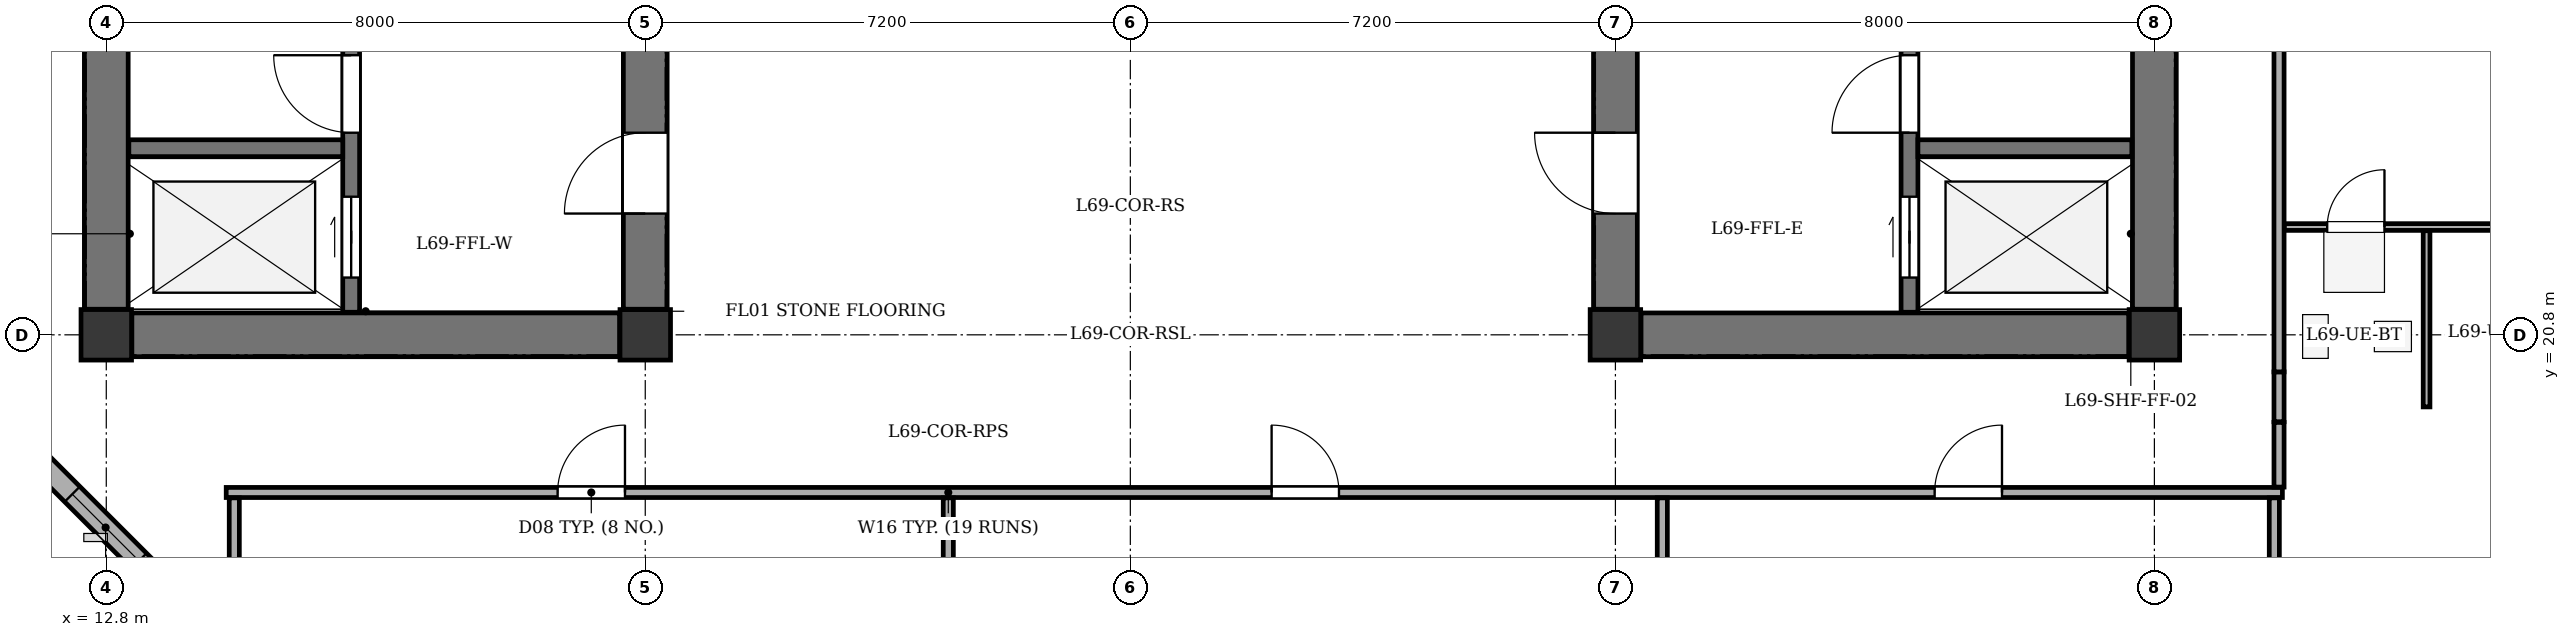
"""IFC4 building model, lengths in metres.
Left out: names, types, materials, properties, quantities, classifications, styles, units other than length and angle.
Written with IfcOpenShell. Run it as: python <this file> out.ifc"""

import sys

from ifc_helpers import new_model, si_unit, direction, frame, frame_2d, origin, origin_2d, place, context, subcontext, project, spatial, rectangle, extrude, element, fill, save


model = new_model("IFC4")
c1 = context("Model", 3, precision=1e-05, world=origin(), true_north=direction((0.0, 1.0)))
c2 = subcontext(c1, "Body", "Model", "MODEL_VIEW")
j1 = project(units=[si_unit("LENGTHUNIT", "METRE"), si_unit("PLANEANGLEUNIT", "RADIAN")], contexts=[c1])
p1 = place(None, origin())
s1 = spatial("IfcSite", under=j1, at=p1, CompositionType="ELEMENT")
p2 = place(p1, origin())
s2 = spatial("IfcBuilding", under=s1, at=p2, CompositionType="ELEMENT")
p3 = place(p2, frame((0.0, 0.0, 261.9)))
s3 = spatial("IfcBuildingStorey", under=s2, at=p3, CompositionType="ELEMENT", Elevation=261.9)
for number, where, z_axis, x_axis in (
    (1, (12.8, 20.8, 0.0), (0.0, 0.0, 1.0), (1.0, 0.0, 0.0)),
    (2, (20.8, 20.8, 0.0), (0.0, 0.0, 1.0), (1.0, 0.0, 0.0)),
    (3, (35.2, 20.8, 0.0), (0.0, 0.0, 1.0), (1.0, 0.0, 0.0)),
    (4, (43.2, 20.8, 0.0), (0.0, 0.0, 1.0), (1.0, 0.0, 0.0)),
):
    element("IfcColumn", number, at=place(p3, frame(where, z_axis=z_axis, x_axis=x_axis)), inside=s3, PredefinedType="COLUMN", context=c2, shape_type="SweptSolid", body=[
        extrude(rectangle(XDim=0.75, YDim=0.75, at=origin_2d()), origin(), (0.0, 0.0, 1.0), 3.4),
    ])
p4 = place(p3, frame((14.7, 16.03, 0.0), z_axis=(0.0, 0.0, 1.0), x_axis=(-0.707106781187, 0.707106781187, 0.0)))
e5 = element("IfcWall", 5, at=p4, inside=s3, PredefinedType="STANDARD", context=c2, shape_type="SweptSolid", body=[
    extrude(rectangle(XDim=5.402, YDim=0.32, at=frame_2d((2.701, 0.0))), origin(), (0.0, 0.0, 1.0), 2.725),
])
p5 = place(p4, frame((2.001, 0.0, 0.75)))
e6 = element("IfcOpeningElement", 6, at=p5, cuts=e5, PredefinedType="OPENING", context=c2, shape_type="SweptSolid", body=[
    extrude(rectangle(XDim=1.4, YDim=1.65, at=frame_2d((0.7, 0.825))), frame((0.0, 0.17, 0.0), z_axis=(0.0, -1.0, 0.0), x_axis=(1.0, 0.0, 0.0)), (0.0, 0.0, 1.0), 0.34),
])
p6 = place(p3, frame((12.8, 21.18, 0.0), z_axis=(0.0, 0.0, 1.0), x_axis=(0.0, 1.0, 0.0)))
e7 = element("IfcWall", 7, at=p6, inside=s3, PredefinedType="SHEAR", context=c2, shape_type="SweptSolid", body=[
    extrude(rectangle(XDim=12.04, YDim=0.65, at=frame_2d((6.02, 0.0))), origin(), (0.0, 0.0, 1.0), 3.1),
])
p7 = place(p3, frame((13.18, 20.8, 0.0), z_axis=(0.0, 0.0, 1.0), x_axis=(1.0, 0.0, 0.0)))
e8 = element("IfcWall", 8, at=p7, inside=s3, PredefinedType="SHEAR", context=c2, shape_type="SweptSolid", body=[
    extrude(rectangle(XDim=7.24, YDim=0.65, at=frame_2d((3.62, 0.0))), origin(), (0.0, 0.0, 1.0), 3.1),
])
p8 = place(p3, frame((20.8, 21.18, 0.0), z_axis=(0.0, 0.0, 1.0), x_axis=(0.0, 1.0, 0.0)))
e9 = element("IfcWall", 9, at=p8, inside=s3, PredefinedType="SHEAR", context=c2, shape_type="SweptSolid", body=[
    extrude(rectangle(XDim=3.87, YDim=0.65, at=frame_2d((1.935, 0.0))), origin(), (0.0, 0.0, 1.0), 3.1),
])
p9 = place(p8, frame((1.42, 0.0, 0.0)))
e10 = element("IfcOpeningElement", 10, at=p9, cuts=e9, PredefinedType="OPENING", context=c2, shape_type="SweptSolid", body=[
    extrude(rectangle(XDim=1.2, YDim=2.15, at=frame_2d((0.6, 1.075))), frame((0.0, 0.335, 0.0), z_axis=(0.0, -1.0, 0.0), x_axis=(1.0, 0.0, 0.0)), (0.0, 0.0, 1.0), 0.67),
])
p10 = place(p3, frame((16.435, 21.135, 0.0), z_axis=(0.0, 0.0, 1.0), x_axis=(0.0, 1.0, 0.0)))
e11 = element("IfcWall", 11, at=p10, inside=s3, PredefinedType="SHEAR", context=c2, shape_type="SweptSolid", body=[
    extrude(rectangle(XDim=12.13, YDim=0.25, at=frame_2d((6.065, 0.0))), origin(), (0.0, 0.0, 1.0), 3.1),
])
p11 = place(p10, frame((0.515, 0.0, 0.0)))
e12 = element("IfcOpeningElement", 12, at=p11, cuts=e11, PredefinedType="OPENING", context=c2, shape_type="SweptSolid", body=[
    extrude(rectangle(XDim=1.2, YDim=2.15, at=frame_2d((0.6, 1.075))), frame((0.0, 0.135, 0.0), z_axis=(0.0, -1.0, 0.0), x_axis=(1.0, 0.0, 0.0)), (0.0, 0.0, 1.0), 0.27),
])
p12 = place(p10, frame((2.665, 0.0, 0.0)))
e13 = element("IfcOpeningElement", 13, at=p12, cuts=e11, PredefinedType="OPENING", context=c2, shape_type="SweptSolid", body=[
    extrude(rectangle(XDim=1.15, YDim=2.15, at=frame_2d((0.575, 1.075))), frame((0.0, 0.135, 0.0), z_axis=(0.0, -1.0, 0.0), x_axis=(1.0, 0.0, 0.0)), (0.0, 0.0, 1.0), 0.27),
])
p13 = place(p3, frame((13.135, 23.57, 0.0), z_axis=(0.0, 0.0, 1.0), x_axis=(1.0, 0.0, 0.0)))
e14 = element("IfcWall", 14, at=p13, inside=s3, PredefinedType="SHEAR", context=c2, shape_type="SweptSolid", body=[
    extrude(rectangle(XDim=3.175, YDim=0.25, at=frame_2d((1.587, 0.0))), origin(), (0.0, 0.0, 1.0), 3.1),
])
p14 = place(p3, frame((43.2, 21.18, 0.0), z_axis=(0.0, 0.0, 1.0), x_axis=(0.0, 1.0, 0.0)))
e15 = element("IfcWall", 15, at=p14, inside=s3, PredefinedType="SHEAR", context=c2, shape_type="SweptSolid", body=[
    extrude(rectangle(XDim=12.04, YDim=0.65, at=frame_2d((6.02, 0.0))), origin(), (0.0, 0.0, 1.0), 3.1),
])
p15 = place(p3, frame((35.58, 20.8, 0.0), z_axis=(0.0, 0.0, 1.0), x_axis=(1.0, 0.0, 0.0)))
e16 = element("IfcWall", 16, at=p15, inside=s3, PredefinedType="SHEAR", context=c2, shape_type="SweptSolid", body=[
    extrude(rectangle(XDim=7.24, YDim=0.65, at=frame_2d((3.62, 0.0))), origin(), (0.0, 0.0, 1.0), 3.1),
])
p16 = place(p3, frame((35.2, 21.18, 0.0), z_axis=(0.0, 0.0, 1.0), x_axis=(0.0, 1.0, 0.0)))
e17 = element("IfcWall", 17, at=p16, inside=s3, PredefinedType="SHEAR", context=c2, shape_type="SweptSolid", body=[
    extrude(rectangle(XDim=3.87, YDim=0.65, at=frame_2d((1.935, 0.0))), origin(), (0.0, 0.0, 1.0), 3.1),
])
p17 = place(p16, frame((1.42, 0.0, 0.0)))
e18 = element("IfcOpeningElement", 18, at=p17, cuts=e17, PredefinedType="OPENING", context=c2, shape_type="SweptSolid", body=[
    extrude(rectangle(XDim=1.2, YDim=2.15, at=frame_2d((0.6, 1.075))), frame((0.0, 0.335, 0.0), z_axis=(0.0, -1.0, 0.0), x_axis=(1.0, 0.0, 0.0)), (0.0, 0.0, 1.0), 0.67),
])
p18 = place(p3, frame((39.565, 21.135, 0.0), z_axis=(0.0, 0.0, 1.0), x_axis=(0.0, 1.0, 0.0)))
e19 = element("IfcWall", 19, at=p18, inside=s3, PredefinedType="SHEAR", context=c2, shape_type="SweptSolid", body=[
    extrude(rectangle(XDim=12.13, YDim=0.25, at=frame_2d((6.065, 0.0))), origin(), (0.0, 0.0, 1.0), 3.1),
])
p19 = place(p18, frame((0.515, 0.0, 0.0)))
e20 = element("IfcOpeningElement", 20, at=p19, cuts=e19, PredefinedType="OPENING", context=c2, shape_type="SweptSolid", body=[
    extrude(rectangle(XDim=1.2, YDim=2.15, at=frame_2d((0.6, 1.075))), frame((0.0, 0.135, 0.0), z_axis=(0.0, -1.0, 0.0), x_axis=(1.0, 0.0, 0.0)), (0.0, 0.0, 1.0), 0.27),
])
p20 = place(p18, frame((2.665, 0.0, 0.0)))
e21 = element("IfcOpeningElement", 21, at=p20, cuts=e19, PredefinedType="OPENING", context=c2, shape_type="SweptSolid", body=[
    extrude(rectangle(XDim=1.15, YDim=2.15, at=frame_2d((0.575, 1.075))), frame((0.0, 0.135, 0.0), z_axis=(0.0, -1.0, 0.0), x_axis=(1.0, 0.0, 0.0)), (0.0, 0.0, 1.0), 0.27),
])
p21 = place(p3, frame((39.69, 23.57, 0.0), z_axis=(0.0, 0.0, 1.0), x_axis=(1.0, 0.0, 0.0)))
e22 = element("IfcWall", 22, at=p21, inside=s3, PredefinedType="SHEAR", context=c2, shape_type="SweptSolid", body=[
    extrude(rectangle(XDim=3.175, YDim=0.25, at=frame_2d((1.587, 0.0))), origin(), (0.0, 0.0, 1.0), 3.1),
])
p22 = place(p3, frame((14.58, 18.46, 0.0), z_axis=(0.0, 0.0, 1.0), x_axis=(1.0, 0.0, 0.0)))
e23 = element("IfcWall", 23, at=p22, inside=s3, PredefinedType="PARTITIONING", context=c2, shape_type="SweptSolid", body=[
    extrude(rectangle(XDim=30.52, YDim=0.15, at=frame_2d((15.26, 0.0))), origin(), (0.0, 0.0, 1.0), 3.1),
])
p23 = place(p22, frame((4.919, 0.0, 0.0)))
e24 = element("IfcOpeningElement", 24, at=p23, cuts=e23, PredefinedType="OPENING", context=c2, shape_type="SweptSolid", body=[
    extrude(rectangle(XDim=1.0, YDim=2.1, at=frame_2d((0.5, 1.05))), frame((0.0, 0.085, 0.0), z_axis=(0.0, -1.0, 0.0), x_axis=(1.0, 0.0, 0.0)), (0.0, 0.0, 1.0), 0.17),
])
p24 = place(p22, frame((15.517, 0.0, 0.0)))
e25 = element("IfcOpeningElement", 25, at=p24, cuts=e23, PredefinedType="OPENING", context=c2, shape_type="SweptSolid", body=[
    extrude(rectangle(XDim=1.0, YDim=2.1, at=frame_2d((0.5, 1.05))), frame((0.0, 0.085, 0.0), z_axis=(0.0, -1.0, 0.0), x_axis=(1.0, 0.0, 0.0)), (0.0, 0.0, 1.0), 0.17),
])
p25 = place(p22, frame((25.358, 0.0, 0.0)))
e26 = element("IfcOpeningElement", 26, at=p25, cuts=e23, PredefinedType="OPENING", context=c2, shape_type="SweptSolid", body=[
    extrude(rectangle(XDim=1.0, YDim=2.1, at=frame_2d((0.5, 1.05))), frame((0.0, 0.085, 0.0), z_axis=(0.0, -1.0, 0.0), x_axis=(1.0, 0.0, 0.0)), (0.0, 0.0, 1.0), 0.17),
])
for number, where, z_axis, x_axis in (
    (27, (14.7, 16.195, 0.0), (0.0, 0.0, 1.0), (0.0, 1.0, 0.0)),
    (28, (25.298, 16.195, 0.0), (0.0, 0.0, 1.0), (0.0, 1.0, 0.0)),
    (29, (35.896, 16.195, 0.0), (0.0, 0.0, 1.0), (0.0, 1.0, 0.0)),
):
    element("IfcWall", number, at=place(p3, frame(where, z_axis=z_axis, x_axis=x_axis)), inside=s3, PredefinedType="PARTITIONING", context=c2, shape_type="SweptSolid", body=[
        extrude(rectangle(XDim=2.185, YDim=0.15, at=frame_2d((1.092, 0.0))), origin(), (0.0, 0.0, 1.0), 3.1),
    ])
p26 = place(p3, frame((44.98, 16.195, 0.0), z_axis=(0.0, 0.0, 1.0), x_axis=(0.0, 1.0, 0.0)))
e30 = element("IfcWall", 30, at=p26, inside=s3, PredefinedType="PARTITIONING", context=c2, shape_type="SweptSolid", body=[
    extrude(rectangle(XDim=2.185, YDim=0.15, at=frame_2d((1.092, 0.0))), origin(), (0.0, 0.0, 1.0), 2.725),
])
p27 = place(p3, frame((45.05, 19.5, 0.0), z_axis=(0.0, 0.0, 1.0), x_axis=(0.0, -1.0, 0.0)))
e31 = element("IfcWall", 31, at=p27, inside=s3, PredefinedType="PARTITIONING", context=c2, shape_type="SweptSolid", body=[
    extrude(rectangle(XDim=0.96, YDim=0.15, at=frame_2d((0.48, 0.0))), origin(), (0.0, 0.0, 1.0), 2.725),
])
p28 = place(p3, frame((45.05, 19.51, 0.0), z_axis=(0.0, 0.0, 1.0), x_axis=(0.0, 1.0, 0.0)))
e32 = element("IfcWall", 32, at=p28, inside=s3, PredefinedType="PARTITIONING", context=c2, shape_type="SweptSolid", body=[
    extrude(rectangle(XDim=0.74, YDim=0.15, at=frame_2d((0.37, 0.0))), origin(), (0.0, 0.0, 1.0), 2.725),
])
p29 = place(p3, frame((45.05, 20.25, 0.0), z_axis=(0.0, 0.0, 1.0), x_axis=(0.0, 1.0, 0.0)))
e33 = element("IfcWall", 33, at=p29, inside=s3, PredefinedType="PARTITIONING", context=c2, shape_type="SweptSolid", body=[
    extrude(rectangle(XDim=13.9, YDim=0.15, at=frame_2d((6.95, 0.0))), origin(), (0.0, 0.0, 1.0), 2.725),
])
p30 = place(p3, frame((45.13, 22.4, 0.0), z_axis=(0.0, 0.0, 1.0), x_axis=(1.0, 0.0, 0.0)))
e34 = element("IfcWall", 34, at=p30, inside=s3, PredefinedType="PARTITIONING", context=c2, shape_type="SweptSolid", body=[
    extrude(rectangle(XDim=10.225, YDim=0.1, at=frame_2d((5.113, 0.0))), origin(), (0.0, 0.0, 1.0), 3.1),
])
p31 = place(p30, frame((0.635, 0.0, 0.0)))
e35 = element("IfcOpeningElement", 35, at=p31, cuts=e34, PredefinedType="OPENING", context=c2, shape_type="SweptSolid", body=[
    extrude(rectangle(XDim=0.85, YDim=2.05, at=frame_2d((0.425, 1.025))), frame((0.0, 0.06, 0.0), z_axis=(0.0, -1.0, 0.0), x_axis=(1.0, 0.0, 0.0)), (0.0, 0.0, 1.0), 0.12),
])
p32 = place(p30, frame((3.632, 0.0, 0.0)))
e36 = element("IfcOpeningElement", 36, at=p32, cuts=e34, PredefinedType="OPENING", context=c2, shape_type="SweptSolid", body=[
    extrude(rectangle(XDim=0.85, YDim=2.05, at=frame_2d((0.425, 1.025))), frame((0.0, 0.06, 0.0), z_axis=(0.0, -1.0, 0.0), x_axis=(1.0, 0.0, 0.0)), (0.0, 0.0, 1.0), 0.12),
])
p33 = place(p30, frame((7.552, 0.0, 0.0)))
e37 = element("IfcOpeningElement", 37, at=p33, cuts=e34, PredefinedType="OPENING", context=c2, shape_type="SweptSolid", body=[
    extrude(rectangle(XDim=0.9, YDim=2.05, at=frame_2d((0.45, 1.025))), frame((0.0, 0.06, 0.0), z_axis=(0.0, -1.0, 0.0), x_axis=(1.0, 0.0, 0.0)), (0.0, 0.0, 1.0), 0.12),
])
p34 = place(p3, frame((47.24, 19.73, 0.0), z_axis=(0.0, 0.0, 1.0), x_axis=(0.0, 1.0, 0.0)))
e38 = element("IfcWall", 38, at=p34, inside=s3, PredefinedType="PARTITIONING", context=c2, shape_type="SweptSolid", body=[
    extrude(rectangle(XDim=2.615, YDim=0.1, at=frame_2d((1.308, 0.0))), origin(), (0.0, 0.0, 1.0), 2.725),
])
p35 = place(p5, origin())
e39 = element("IfcWindow", 39, at=p35, inside=s3, PartitioningType="SINGLE_PANEL", PredefinedType="WINDOW", context=c2, shape_type="SweptSolid", body=[
    extrude(rectangle(XDim=1.4, YDim=1.65, at=frame_2d((0.7, 0.825))), frame((0.0, -0.01, 0.0), z_axis=(0.0, -1.0, 0.0), x_axis=(1.0, 0.0, 0.0)), (0.0, 0.0, 1.0), 0.06),
])
fill(e6, e39)
p36 = place(p9, origin())
e40 = element("IfcDoor", 40, at=p36, inside=s3, OperationType="SINGLE_SWING_LEFT", PredefinedType="DOOR", context=c2, shape_type="SweptSolid", body=[
    extrude(rectangle(XDim=1.2, YDim=2.15, at=frame_2d((0.6, 1.075))), frame((0.0, 0.025, 0.0), z_axis=(0.0, -1.0, 0.0), x_axis=(1.0, 0.0, 0.0)), (0.0, 0.0, 1.0), 0.05),
])
fill(e10, e40)
p37 = place(p11, origin())
e41 = element("IfcDoor", 41, at=p37, inside=s3, OperationType="DOUBLE_DOOR_SLIDING", PredefinedType="DOOR", context=c2, shape_type="SweptSolid", body=[
    extrude(rectangle(XDim=1.2, YDim=2.15, at=frame_2d((0.6, 1.075))), frame((0.0, 0.025, 0.0), z_axis=(0.0, -1.0, 0.0), x_axis=(1.0, 0.0, 0.0)), (0.0, 0.0, 1.0), 0.05),
])
fill(e12, e41)
p38 = place(p12, origin())
e42 = element("IfcDoor", 42, at=p38, inside=s3, OperationType="SINGLE_SWING_RIGHT", PredefinedType="DOOR", context=c2, shape_type="SweptSolid", body=[
    extrude(rectangle(XDim=1.15, YDim=2.15, at=frame_2d((0.575, 1.075))), frame((0.0, 0.025, 0.0), z_axis=(0.0, -1.0, 0.0), x_axis=(1.0, 0.0, 0.0)), (0.0, 0.0, 1.0), 0.05),
])
fill(e13, e42)
p39 = place(p17, origin())
e43 = element("IfcDoor", 43, at=p39, inside=s3, OperationType="SINGLE_SWING_RIGHT", PredefinedType="DOOR", context=c2, shape_type="SweptSolid", body=[
    extrude(rectangle(XDim=1.2, YDim=2.15, at=frame_2d((0.6, 1.075))), frame((0.0, 0.025, 0.0), z_axis=(0.0, -1.0, 0.0), x_axis=(1.0, 0.0, 0.0)), (0.0, 0.0, 1.0), 0.05),
])
fill(e18, e43)
p40 = place(p19, origin())
e44 = element("IfcDoor", 44, at=p40, inside=s3, OperationType="DOUBLE_DOOR_SLIDING", PredefinedType="DOOR", context=c2, shape_type="SweptSolid", body=[
    extrude(rectangle(XDim=1.2, YDim=2.15, at=frame_2d((0.6, 1.075))), frame((0.0, 0.025, 0.0), z_axis=(0.0, -1.0, 0.0), x_axis=(1.0, 0.0, 0.0)), (0.0, 0.0, 1.0), 0.05),
])
fill(e20, e44)
p41 = place(p20, origin())
e45 = element("IfcDoor", 45, at=p41, inside=s3, OperationType="SINGLE_SWING_LEFT", PredefinedType="DOOR", context=c2, shape_type="SweptSolid", body=[
    extrude(rectangle(XDim=1.15, YDim=2.15, at=frame_2d((0.575, 1.075))), frame((0.0, 0.025, 0.0), z_axis=(0.0, -1.0, 0.0), x_axis=(1.0, 0.0, 0.0)), (0.0, 0.0, 1.0), 0.05),
])
fill(e21, e45)
p42 = place(p23, origin())
e46 = element("IfcDoor", 46, at=p42, inside=s3, OperationType="SINGLE_SWING_RIGHT", PredefinedType="DOOR", context=c2, shape_type="SweptSolid", body=[
    extrude(rectangle(XDim=1.0, YDim=2.1, at=frame_2d((0.5, 1.05))), frame((0.0, 0.025, 0.0), z_axis=(0.0, -1.0, 0.0), x_axis=(1.0, 0.0, 0.0)), (0.0, 0.0, 1.0), 0.05),
])
fill(e24, e46)
p43 = place(p24, origin())
e47 = element("IfcDoor", 47, at=p43, inside=s3, OperationType="SINGLE_SWING_LEFT", PredefinedType="DOOR", context=c2, shape_type="SweptSolid", body=[
    extrude(rectangle(XDim=1.0, YDim=2.1, at=frame_2d((0.5, 1.05))), frame((0.0, 0.025, 0.0), z_axis=(0.0, -1.0, 0.0), x_axis=(1.0, 0.0, 0.0)), (0.0, 0.0, 1.0), 0.05),
])
fill(e25, e47)
p44 = place(p25, origin())
e48 = element("IfcDoor", 48, at=p44, inside=s3, OperationType="SINGLE_SWING_RIGHT", PredefinedType="DOOR", context=c2, shape_type="SweptSolid", body=[
    extrude(rectangle(XDim=1.0, YDim=2.1, at=frame_2d((0.5, 1.05))), frame((0.0, 0.025, 0.0), z_axis=(0.0, -1.0, 0.0), x_axis=(1.0, 0.0, 0.0)), (0.0, 0.0, 1.0), 0.05),
])
fill(e26, e48)
p45 = place(p31, origin())
e49 = element("IfcDoor", 49, at=p45, inside=s3, OperationType="SINGLE_SWING_RIGHT", PredefinedType="DOOR", context=c2, shape_type="SweptSolid", body=[
    extrude(rectangle(XDim=0.85, YDim=2.05, at=frame_2d((0.425, 1.025))), frame((0.0, 0.025, 0.0), z_axis=(0.0, -1.0, 0.0), x_axis=(1.0, 0.0, 0.0)), (0.0, 0.0, 1.0), 0.05),
])
fill(e35, e49)
save(model, sys.argv[1])
